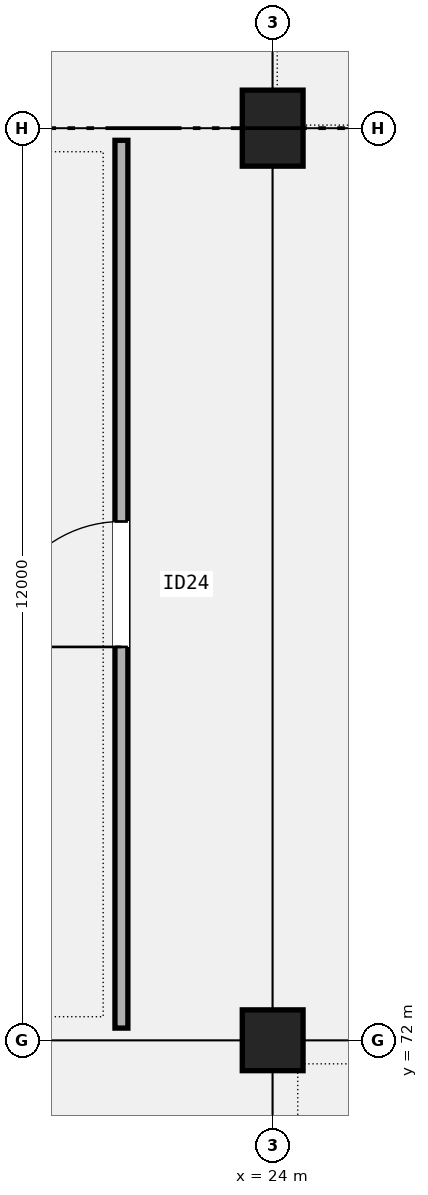
"""IFC4 building model, lengths in metres.
Left out: names, types, materials, properties, quantities, classifications, styles, units other than length and angle.
Written with IfcOpenShell. Run it as: python <this file> out.ifc"""

import sys

from ifc_helpers import new_model, si_unit, direction, frame, frame_2d, origin, origin_2d, place, context, subcontext, project, spatial, rectangle, extrude, element, fill, save


model = new_model("IFC4")
c1 = context("Model", 3, precision=1e-05, world=origin(), true_north=direction((0.0, 1.0)))
c2 = subcontext(c1, "Body", "Model", "MODEL_VIEW")
j1 = project(units=[si_unit("LENGTHUNIT", "METRE"), si_unit("PLANEANGLEUNIT", "RADIAN")], contexts=[c1])
p1 = place(None, origin())
s1 = spatial("IfcSite", under=j1, at=p1, CompositionType="ELEMENT")
p2 = place(p1, origin())
s2 = spatial("IfcBuilding", under=s1, at=p2, CompositionType="ELEMENT")
p3 = place(p2, frame((0.0, 0.0, 5.4)))
s3 = spatial("IfcBuildingStorey", under=s2, at=p3, CompositionType="ELEMENT", Elevation=5.4)
p4 = place(p3, frame((24.0, 72.0, 0.0), z_axis=(0.0, 0.0, 1.0), x_axis=(1.0, 0.0, 0.0)))
e1 = element("IfcColumn", 1, at=p4, inside=s3, PredefinedType="COLUMN", context=c2, shape_type="SweptSolid", body=[
    extrude(rectangle(XDim=0.8, YDim=0.8, at=origin_2d()), origin(), (0.0, 0.0, 1.0), 4.8),
])
p5 = place(p3, frame((24.0, 84.0, 0.0), z_axis=(0.0, 0.0, 1.0), x_axis=(1.0, 0.0, 0.0)))
e2 = element("IfcColumn", 2, at=p5, inside=s3, PredefinedType="COLUMN", context=c2, shape_type="SweptSolid", body=[
    extrude(rectangle(XDim=0.8, YDim=1.0, at=origin_2d()), origin(), (0.0, 0.0, 1.0), 4.8),
])
p6 = place(p3, frame((22.01, 72.16, 0.0), z_axis=(0.0, 0.0, 1.0), x_axis=(0.0, 1.0, 0.0)))
e3 = element("IfcWall", 3, at=p6, inside=s3, PredefinedType="PARTITIONING", context=c2, shape_type="SweptSolid", body=[
    extrude(rectangle(XDim=11.68, YDim=0.17, at=frame_2d((5.84, 0.0))), origin(), (0.0, 0.0, 1.0), 3.92),
])
p7 = place(p6, frame((5.015, 0.0, 0.0)))
e4 = element("IfcOpeningElement", 4, at=p7, cuts=e3, PredefinedType="OPENING", context=c2, shape_type="SweptSolid", body=[
    extrude(rectangle(XDim=1.65, YDim=2.28, at=frame_2d((0.825, 1.14))), frame((0.0, 0.095, 0.0), z_axis=(0.0, -1.0, 0.0), x_axis=(1.0, 0.0, 0.0)), (0.0, 0.0, 1.0), 0.19),
])
p8 = place(p7, origin())
e5 = element("IfcDoor", 5, at=p8, inside=s3, OperationType="SINGLE_SWING_LEFT", PredefinedType="DOOR", context=c2, shape_type="SweptSolid", body=[
    extrude(rectangle(XDim=1.65, YDim=2.28, at=frame_2d((0.825, 1.14))), frame((0.0, 0.025, 0.0), z_axis=(0.0, -1.0, 0.0), x_axis=(1.0, 0.0, 0.0)), (0.0, 0.0, 1.0), 0.05),
])
fill(e4, e5)
save(model, sys.argv[1])
